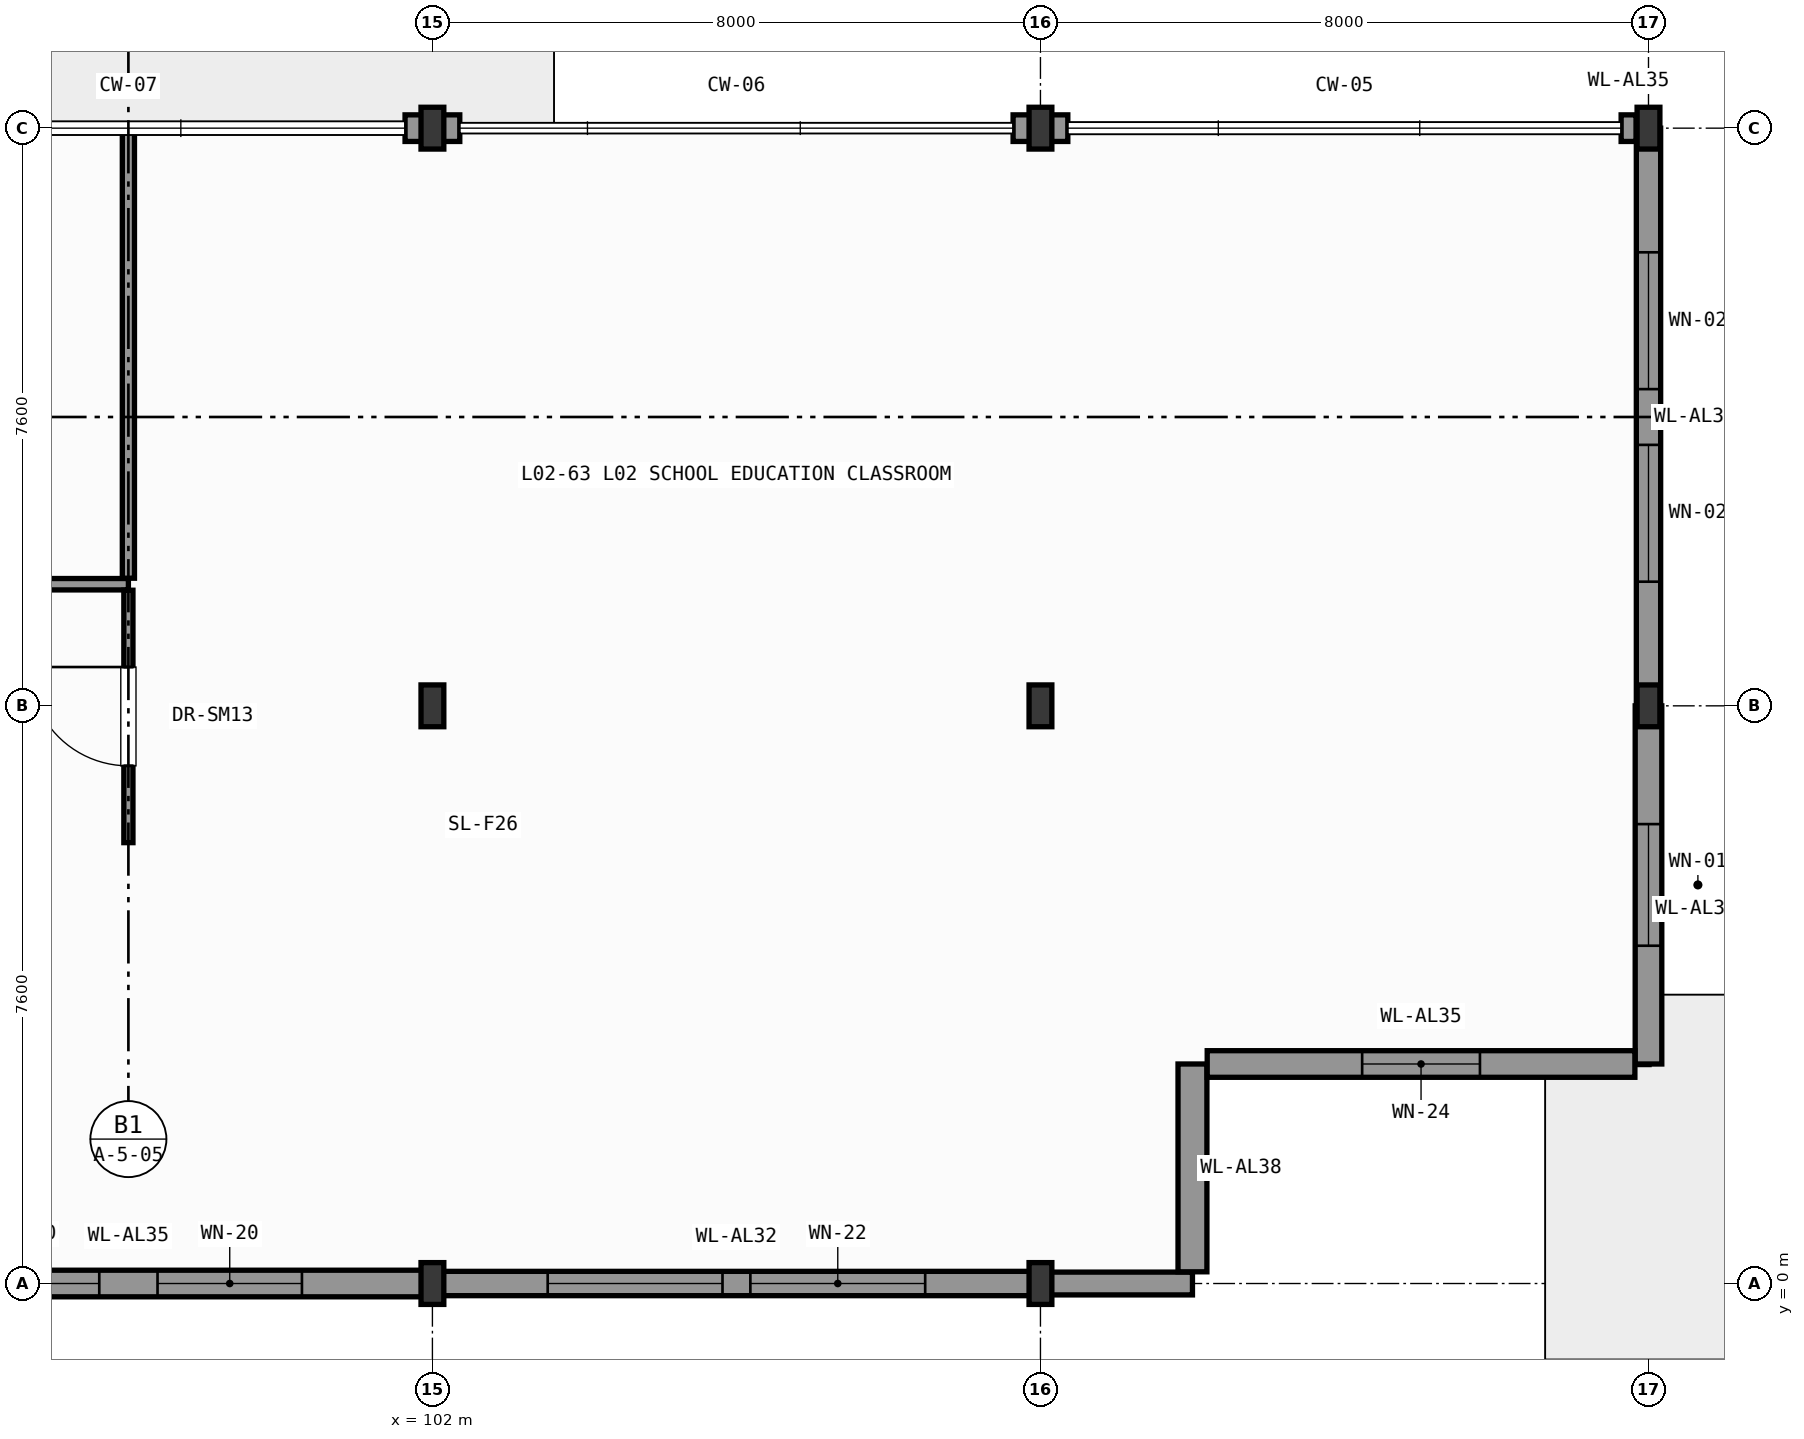
"""IFC4 building model, lengths in metres.
Left out: names, types, materials, properties, quantities, classifications, styles, units other than length and angle.
Written with IfcOpenShell. Run it as: python <this file> out.ifc"""

import sys

from ifc_helpers import new_model, si_unit, direction, frame, frame_2d, origin, origin_2d, place, context, subcontext, project, spatial, rectangle, i_section, extrude, element, fill, save


model = new_model("IFC4")
c1 = context("Model", 3, precision=1e-05, world=origin(), true_north=direction((0.0, 1.0)))
c2 = subcontext(c1, "Body", "Model", "MODEL_VIEW")
j1 = project(units=[si_unit("LENGTHUNIT", "METRE"), si_unit("PLANEANGLEUNIT", "RADIAN")], contexts=[c1])
p1 = place(None, origin())
s1 = spatial("IfcSite", under=j1, at=p1, CompositionType="ELEMENT")
p2 = place(p1, origin())
s2 = spatial("IfcBuilding", under=s1, at=p2, CompositionType="ELEMENT")
p3 = place(p2, frame((0.0, 0.0, 7.8)))
s3 = spatial("IfcBuildingStorey", under=s2, at=p3, CompositionType="ELEMENT", Elevation=7.8)
for number, where, z_axis, x_axis in (
    (1, (102.0, 0.0, 0.0), (0.0, 0.0, 1.0), (1.0, 0.0, 0.0)),
    (2, (102.0, 7.6, 0.0), (0.0, 0.0, 1.0), (1.0, 0.0, 0.0)),
    (3, (102.0, 15.2, 0.0), (0.0, 0.0, 1.0), (1.0, 0.0, 0.0)),
    (4, (110.0, 0.0, 0.0), (0.0, 0.0, 1.0), (1.0, 0.0, 0.0)),
    (5, (110.0, 7.6, 0.0), (0.0, 0.0, 1.0), (1.0, 0.0, 0.0)),
    (6, (110.0, 15.2, 0.0), (0.0, 0.0, 1.0), (1.0, 0.0, 0.0)),
    (7, (118.0, 7.6, 0.0), (0.0, 0.0, 1.0), (1.0, 0.0, 0.0)),
    (8, (118.0, 15.2, 0.0), (0.0, 0.0, 1.0), (1.0, 0.0, 0.0)),
):
    element("IfcColumn", number, at=place(p3, frame(where, z_axis=z_axis, x_axis=x_axis)), inside=s3, PredefinedType="COLUMN", context=c2, shape_type="SweptSolid", body=[
        extrude(i_section(OverallWidth=0.3, OverallDepth=0.55, WebThickness=0.015, FlangeThickness=0.029, FilletRadius=0.027, at=origin_2d()), origin(), (0.0, 0.0, 1.0), 5.4),
    ])
p4 = place(p3, frame((118.0, 7.6, 0.0), z_axis=(0.0, 0.0, 1.0), x_axis=(0.0, -1.0, 0.0)))
e9 = element("IfcWall", 9, at=p4, inside=s3, PredefinedType="SOLIDWALL", context=c2, shape_type="SweptSolid", body=[
    extrude(rectangle(XDim=4.712, YDim=0.35, at=frame_2d((2.356, 0.0))), origin(), (0.0, 0.0, 1.0), 5.15),
])
p5 = place(p4, frame((1.556, 0.0, 0.95)))
e10 = element("IfcOpeningElement", 10, at=p5, cuts=e9, PredefinedType="OPENING", context=c2, shape_type="SweptSolid", body=[
    extrude(rectangle(XDim=1.6, YDim=2.8, at=frame_2d((0.8, 1.4))), frame((0.0, 0.185, 0.0), z_axis=(0.0, -1.0, 0.0), x_axis=(1.0, 0.0, 0.0)), (0.0, 0.0, 1.0), 0.37),
])
p6 = place(p3, frame((118.0, 15.2, 0.0), z_axis=(0.0, 0.0, 1.0), x_axis=(0.0, -1.0, 0.0)))
e11 = element("IfcWall", 11, at=p6, inside=s3, PredefinedType="SOLIDWALL", context=c2, shape_type="SweptSolid", body=[
    extrude(rectangle(XDim=7.6, YDim=0.32, at=frame_2d((3.8, 0.0))), origin(), (0.0, 0.0, 1.0), 4.685),
])
p7 = place(p6, frame((1.633, 0.0, 0.95)))
e12 = element("IfcOpeningElement", 12, at=p7, cuts=e11, PredefinedType="OPENING", context=c2, shape_type="SweptSolid", body=[
    extrude(rectangle(XDim=1.8, YDim=3.2, at=frame_2d((0.9, 1.6))), frame((0.0, 0.17, 0.0), z_axis=(0.0, -1.0, 0.0), x_axis=(1.0, 0.0, 0.0)), (0.0, 0.0, 1.0), 0.34),
])
p8 = place(p6, frame((4.167, 0.0, 0.95)))
e13 = element("IfcOpeningElement", 13, at=p8, cuts=e11, PredefinedType="OPENING", context=c2, shape_type="SweptSolid", body=[
    extrude(rectangle(XDim=1.8, YDim=3.2, at=frame_2d((0.9, 1.6))), frame((0.0, 0.17, 0.0), z_axis=(0.0, -1.0, 0.0), x_axis=(1.0, 0.0, 0.0)), (0.0, 0.0, 1.0), 0.34),
])
p9 = place(p3, frame((117.836, 15.2, 0.0), z_axis=(0.0, 0.0, 1.0), x_axis=(-1.0, 0.0, 0.0)))
e14 = element("IfcWall", 14, at=p9, inside=s3, PredefinedType="SOLIDWALL", context=c2, shape_type="SweptSolid", body=[
    extrude(rectangle(XDim=0.196, YDim=0.35, at=frame_2d((0.098, 0.0))), origin(), (0.0, 0.0, 1.0), 5.15),
])
p10 = place(p3, frame((110.36, 15.2, 0.0), z_axis=(0.0, 0.0, 1.0), x_axis=(-1.0, 0.0, 0.0)))
e15 = element("IfcWall", 15, at=p10, inside=s3, PredefinedType="SOLIDWALL", context=c2, shape_type="SweptSolid", body=[
    extrude(rectangle(XDim=0.36, YDim=0.35, at=frame_2d((0.18, 0.0))), origin(), (0.0, 0.0, 1.0), 4.885),
])
for number, where, z_axis, x_axis in (
    (16, (110.0, 15.2, 0.0), (0.0, 0.0, 1.0), (-1.0, 0.0, 0.0)),
    (17, (102.36, 15.2, 0.0), (0.0, 0.0, 1.0), (-1.0, 0.0, 0.0)),
):
    element("IfcWall", number, at=place(p3, frame(where, z_axis=z_axis, x_axis=x_axis)), inside=s3, PredefinedType="SOLIDWALL", context=c2, shape_type="SweptSolid", body=[
        extrude(rectangle(XDim=0.36, YDim=0.35, at=frame_2d((0.18, 0.0))), origin(), (0.0, 0.0, 1.0), 4.955),
    ])
p11 = place(p3, frame((102.0, 15.2, 0.0), z_axis=(0.0, 0.0, 1.0), x_axis=(-1.0, 0.0, 0.0)))
e18 = element("IfcWall", 18, at=p11, inside=s3, PredefinedType="SOLIDWALL", context=c2, shape_type="SweptSolid", body=[
    extrude(rectangle(XDim=0.36, YDim=0.35, at=frame_2d((0.18, 0.0))), origin(), (0.0, 0.0, 1.0), 4.735),
])
p12 = place(p3, frame((102.0, 0.0, 0.0), z_axis=(0.0, 0.0, 1.0), x_axis=(-1.0, 0.0, 0.0)))
e19 = element("IfcWall", 19, at=p12, inside=s3, PredefinedType="SOLIDWALL", context=c2, shape_type="SweptSolid", body=[
    extrude(rectangle(XDim=8.0, YDim=0.35, at=frame_2d((4.0, 0.0))), origin(), (0.0, 0.0, 1.0), 4.795),
])
p13 = place(p12, frame((1.717, 0.0, 0.95)))
e20 = element("IfcOpeningElement", 20, at=p13, cuts=e19, PredefinedType="OPENING", context=c2, shape_type="SweptSolid", body=[
    extrude(rectangle(XDim=1.9, YDim=2.9, at=frame_2d((0.95, 1.45))), frame((0.0, 0.185, 0.0), z_axis=(0.0, -1.0, 0.0), x_axis=(1.0, 0.0, 0.0)), (0.0, 0.0, 1.0), 0.37),
])
p14 = place(p12, frame((4.383, 0.0, 0.95)))
e21 = element("IfcOpeningElement", 21, at=p14, cuts=e19, PredefinedType="OPENING", context=c2, shape_type="SweptSolid", body=[
    extrude(rectangle(XDim=1.9, YDim=2.9, at=frame_2d((0.95, 1.45))), frame((0.0, 0.185, 0.0), z_axis=(0.0, -1.0, 0.0), x_axis=(1.0, 0.0, 0.0)), (0.0, 0.0, 1.0), 0.37),
])
p15 = place(p3, frame((110.0, 0.0, 0.0), z_axis=(0.0, 0.0, 1.0), x_axis=(-1.0, 0.0, 0.0)))
e22 = element("IfcWall", 22, at=p15, inside=s3, PredefinedType="SOLIDWALL", context=c2, shape_type="SweptSolid", body=[
    extrude(rectangle(XDim=8.0, YDim=0.32, at=frame_2d((4.0, 0.0))), origin(), (0.0, 0.0, 1.0), 4.795),
])
p16 = place(p15, frame((1.517, 0.0, 0.95)))
e23 = element("IfcOpeningElement", 23, at=p16, cuts=e22, PredefinedType="OPENING", context=c2, shape_type="SweptSolid", body=[
    extrude(rectangle(XDim=2.3, YDim=3.3, at=frame_2d((1.15, 1.65))), frame((0.0, 0.17, 0.0), z_axis=(0.0, -1.0, 0.0), x_axis=(1.0, 0.0, 0.0)), (0.0, 0.0, 1.0), 0.34),
])
p17 = place(p15, frame((4.183, 0.0, 0.95)))
e24 = element("IfcOpeningElement", 24, at=p17, cuts=e22, PredefinedType="OPENING", context=c2, shape_type="SweptSolid", body=[
    extrude(rectangle(XDim=2.3, YDim=3.3, at=frame_2d((1.15, 1.65))), frame((0.0, 0.17, 0.0), z_axis=(0.0, -1.0, 0.0), x_axis=(1.0, 0.0, 0.0)), (0.0, 0.0, 1.0), 0.34),
])
p18 = place(p3, frame((112.0, 0.0, 0.0), z_axis=(0.0, 0.0, 1.0), x_axis=(-1.0, 0.0, 0.0)))
e25 = element("IfcWall", 25, at=p18, inside=s3, PredefinedType="SOLIDWALL", context=c2, shape_type="SweptSolid", body=[
    extrude(rectangle(XDim=2.0, YDim=0.3, at=frame_2d((1.0, 0.0))), origin(), (0.0, 0.0, 1.0), 5.15),
])
p19 = place(p3, frame((112.0, 2.888, 0.0), z_axis=(0.0, 0.0, 1.0), x_axis=(0.0, -1.0, 0.0)))
e26 = element("IfcWall", 26, at=p19, inside=s3, PredefinedType="SOLIDWALL", context=c2, shape_type="SweptSolid", body=[
    extrude(rectangle(XDim=2.734, YDim=0.38, at=frame_2d((1.367, 0.0))), origin(), (0.0, 0.0, 1.0), 5.15),
])
p20 = place(p3, frame((117.821, 2.888, 0.0), z_axis=(0.0, 0.0, 1.0), x_axis=(-1.0, 0.0, 0.0)))
e27 = element("IfcWall", 27, at=p20, inside=s3, PredefinedType="SOLIDWALL", context=c2, shape_type="SweptSolid", body=[
    extrude(rectangle(XDim=5.627, YDim=0.35, at=frame_2d((2.813, 0.0))), origin(), (0.0, 0.0, 1.0), 5.15),
])
p21 = place(p20, frame((2.039, 0.0, 0.95)))
e28 = element("IfcOpeningElement", 28, at=p21, cuts=e27, PredefinedType="OPENING", context=c2, shape_type="SweptSolid", body=[
    extrude(rectangle(XDim=1.55, YDim=2.1, at=frame_2d((0.775, 1.05))), frame((0.0, 0.185, 0.0), z_axis=(0.0, -1.0, 0.0), x_axis=(1.0, 0.0, 0.0)), (0.0, 0.0, 1.0), 0.37),
])
p22 = place(p3, frame((86.6, 9.2, 0.0), z_axis=(0.0, 0.0, 1.0), x_axis=(1.0, 0.0, 0.0)))
e29 = element("IfcWall", 29, at=p22, inside=s3, PredefinedType="PARTITIONING", context=c2, shape_type="SweptSolid", body=[
    extrude(rectangle(XDim=11.4, YDim=0.15, at=frame_2d((5.7, 0.0))), origin(), (0.0, 0.0, 1.0), 5.15),
])
p23 = place(p22, frame((4.6, 0.0, 0.0)))
e30 = element("IfcOpeningElement", 30, at=p23, cuts=e29, PredefinedType="OPENING", context=c2, shape_type="SweptSolid", body=[
    extrude(rectangle(XDim=2.2, YDim=2.6, at=frame_2d((1.1, 1.3))), frame((0.0, 0.085, 0.0), z_axis=(0.0, -1.0, 0.0), x_axis=(1.0, 0.0, 0.0)), (0.0, 0.0, 1.0), 0.17),
])
p24 = place(p3, frame((98.0, 5.8, 0.0), z_axis=(0.0, 0.0, 1.0), x_axis=(0.0, 1.0, 0.0)))
e31 = element("IfcWall", 31, at=p24, inside=s3, PredefinedType="PARTITIONING", context=c2, shape_type="SweptSolid", body=[
    extrude(rectangle(XDim=3.321, YDim=0.12, at=frame_2d((1.661, 0.0))), origin(), (0.0, 0.0, 1.0), 5.15),
])
p25 = place(p24, frame((1.01, 0.0, 0.0)))
e32 = element("IfcOpeningElement", 32, at=p25, cuts=e31, PredefinedType="OPENING", context=c2, shape_type="SweptSolid", body=[
    extrude(rectangle(XDim=1.3, YDim=2.25, at=frame_2d((0.65, 1.125))), frame((0.0, 0.07, 0.0), z_axis=(0.0, -1.0, 0.0), x_axis=(1.0, 0.0, 0.0)), (0.0, 0.0, 1.0), 0.14),
])
p26 = place(p3, frame((98.0, 9.279, 0.0), z_axis=(0.0, 0.0, 1.0), x_axis=(0.0, 1.0, 0.0)))
e33 = element("IfcWall", 33, at=p26, inside=s3, PredefinedType="PARTITIONING", context=c2, shape_type="SweptSolid", body=[
    extrude(rectangle(XDim=5.921, YDim=0.16, at=frame_2d((2.96, 0.0))), origin(), (0.0, 0.0, 1.0), 5.15),
])
p27 = place(p5, origin())
e34 = element("IfcWindow", 34, at=p27, inside=s3, PartitioningType="SINGLE_PANEL", PredefinedType="WINDOW", context=c2, shape_type="SweptSolid", body=[
    extrude(rectangle(XDim=1.6, YDim=2.8, at=frame_2d((0.8, 1.4))), frame((0.0, 0.03, 0.0), z_axis=(0.0, -1.0, 0.0), x_axis=(1.0, 0.0, 0.0)), (0.0, 0.0, 1.0), 0.06),
])
fill(e10, e34)
p28 = place(p7, origin())
e35 = element("IfcWindow", 35, at=p28, inside=s3, PartitioningType="SINGLE_PANEL", PredefinedType="WINDOW", context=c2, shape_type="SweptSolid", body=[
    extrude(rectangle(XDim=1.8, YDim=3.2, at=frame_2d((0.9, 1.6))), frame((0.0, 0.03, 0.0), z_axis=(0.0, -1.0, 0.0), x_axis=(1.0, 0.0, 0.0)), (0.0, 0.0, 1.0), 0.06),
])
fill(e12, e35)
p29 = place(p8, origin())
e36 = element("IfcWindow", 36, at=p29, inside=s3, PartitioningType="SINGLE_PANEL", PredefinedType="WINDOW", context=c2, shape_type="SweptSolid", body=[
    extrude(rectangle(XDim=1.8, YDim=3.2, at=frame_2d((0.9, 1.6))), frame((0.0, 0.03, 0.0), z_axis=(0.0, -1.0, 0.0), x_axis=(1.0, 0.0, 0.0)), (0.0, 0.0, 1.0), 0.06),
])
fill(e13, e36)
p30 = place(p13, origin())
e37 = element("IfcWindow", 37, at=p30, inside=s3, PartitioningType="SINGLE_PANEL", PredefinedType="WINDOW", context=c2, shape_type="SweptSolid", body=[
    extrude(rectangle(XDim=1.9, YDim=2.9, at=frame_2d((0.95, 1.45))), frame((0.0, 0.03, 0.0), z_axis=(0.0, -1.0, 0.0), x_axis=(1.0, 0.0, 0.0)), (0.0, 0.0, 1.0), 0.06),
])
fill(e20, e37)
p31 = place(p14, origin())
e38 = element("IfcWindow", 38, at=p31, inside=s3, PartitioningType="SINGLE_PANEL", PredefinedType="WINDOW", context=c2, shape_type="SweptSolid", body=[
    extrude(rectangle(XDim=1.9, YDim=2.9, at=frame_2d((0.95, 1.45))), frame((0.0, 0.03, 0.0), z_axis=(0.0, -1.0, 0.0), x_axis=(1.0, 0.0, 0.0)), (0.0, 0.0, 1.0), 0.06),
])
fill(e21, e38)
p32 = place(p16, origin())
e39 = element("IfcWindow", 39, at=p32, inside=s3, PartitioningType="SINGLE_PANEL", PredefinedType="WINDOW", context=c2, shape_type="SweptSolid", body=[
    extrude(rectangle(XDim=2.3, YDim=3.3, at=frame_2d((1.15, 1.65))), frame((0.0, 0.03, 0.0), z_axis=(0.0, -1.0, 0.0), x_axis=(1.0, 0.0, 0.0)), (0.0, 0.0, 1.0), 0.06),
])
fill(e23, e39)
p33 = place(p17, origin())
e40 = element("IfcWindow", 40, at=p33, inside=s3, PartitioningType="SINGLE_PANEL", PredefinedType="WINDOW", context=c2, shape_type="SweptSolid", body=[
    extrude(rectangle(XDim=2.3, YDim=3.3, at=frame_2d((1.15, 1.65))), frame((0.0, 0.03, 0.0), z_axis=(0.0, -1.0, 0.0), x_axis=(1.0, 0.0, 0.0)), (0.0, 0.0, 1.0), 0.06),
])
fill(e24, e40)
p34 = place(p21, origin())
e41 = element("IfcWindow", 41, at=p34, inside=s3, PartitioningType="SINGLE_PANEL", PredefinedType="WINDOW", context=c2, shape_type="SweptSolid", body=[
    extrude(rectangle(XDim=1.55, YDim=2.1, at=frame_2d((0.775, 1.05))), frame((0.0, 0.03, 0.0), z_axis=(0.0, -1.0, 0.0), x_axis=(1.0, 0.0, 0.0)), (0.0, 0.0, 1.0), 0.06),
])
fill(e28, e41)
p35 = place(p25, origin())
e42 = element("IfcDoor", 42, at=p35, inside=s3, OperationType="SINGLE_SWING_RIGHT", PredefinedType="DOOR", context=c2, shape_type="SweptSolid", body=[
    extrude(rectangle(XDim=1.3, YDim=2.25, at=frame_2d((0.65, 1.125))), frame((0.0, 0.025, 0.0), z_axis=(0.0, -1.0, 0.0), x_axis=(1.0, 0.0, 0.0)), (0.0, 0.0, 1.0), 0.05),
])
fill(e32, e42)
save(model, sys.argv[1])
